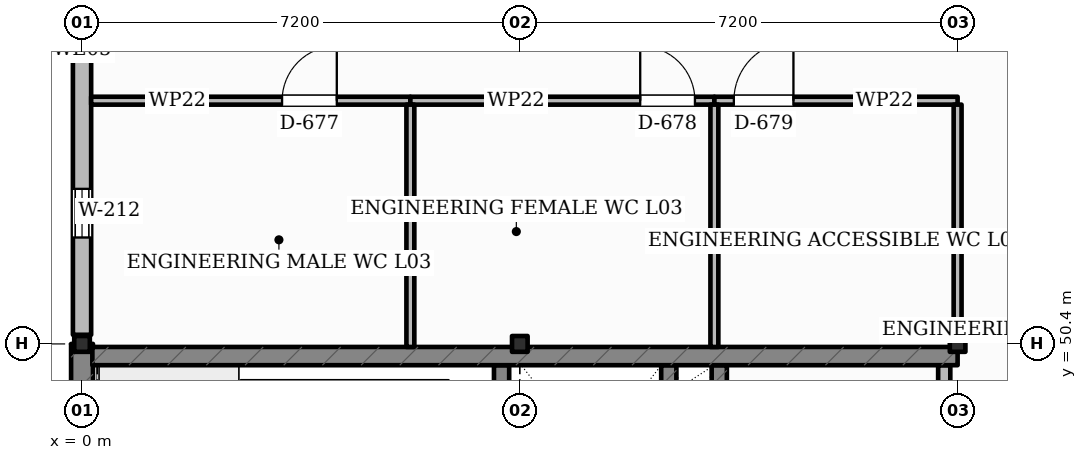
"""IFC4 building model, lengths in metres.
Left out: names, types, materials, properties, quantities, classifications, styles, units other than length and angle.
Written with IfcOpenShell. Run it as: python <this file> out.ifc"""

import sys

from ifc_helpers import new_model, si_unit, direction, frame, frame_2d, origin, origin_2d, place, context, subcontext, project, spatial, rectangle, i_section, extrude, element, fill, save


model = new_model("IFC4")
c1 = context("Model", 3, precision=1e-05, world=origin(), true_north=direction((0.0, 1.0)))
c2 = subcontext(c1, "Body", "Model", "MODEL_VIEW")
j1 = project(units=[si_unit("LENGTHUNIT", "METRE"), si_unit("PLANEANGLEUNIT", "RADIAN")], contexts=[c1])
p1 = place(None, origin())
s1 = spatial("IfcSite", under=j1, at=p1, CompositionType="ELEMENT")
p2 = place(p1, origin())
s2 = spatial("IfcBuilding", under=s1, at=p2, CompositionType="ELEMENT")
p3 = place(p2, frame((0.0, 0.0, 14.4)))
s3 = spatial("IfcBuildingStorey", under=s2, at=p3, CompositionType="ELEMENT", Elevation=14.4)
for number, where, z_axis, x_axis in (
    (1, (0.0, 50.4, 0.0), (0.0, 0.0, 1.0), (1.0, 0.0, 0.0)),
    (2, (7.2, 50.4, 0.0), (0.0, 0.0, 1.0), (1.0, 0.0, 0.0)),
    (3, (14.4, 50.4, 0.0), (0.0, 0.0, 1.0), (1.0, 0.0, 0.0)),
):
    element("IfcColumn", number, at=place(p3, frame(where, z_axis=z_axis, x_axis=x_axis)), inside=s3, PredefinedType="COLUMN", context=c2, shape_type="SweptSolid", body=[
        extrude(i_section(OverallWidth=0.256, OverallDepth=0.26, WebThickness=0.01, FlangeThickness=0.017, FilletRadius=0.013, at=origin_2d()), origin(), (0.0, 0.0, 1.0), 4.5),
    ])
p4 = place(p3, frame((0.0, 43.2, 0.0), z_axis=(0.0, 0.0, 1.0), x_axis=(0.0, 1.0, 0.0)))
e4 = element("IfcWall", 4, at=p4, inside=s3, PredefinedType="SHEAR", context=c2, shape_type="SweptSolid", body=[
    extrude(rectangle(XDim=7.2, YDim=0.36, at=frame_2d((3.6, 0.0))), origin(), (0.0, 0.0, 1.0), 3.85),
])
p5 = place(p3, frame((0.0, 50.55, 0.0), z_axis=(0.0, 0.0, 1.0), x_axis=(0.0, 1.0, 0.0)))
e5 = element("IfcWall", 5, at=p5, inside=s3, PredefinedType="SOLIDWALL", context=c2, shape_type="SweptSolid", body=[
    extrude(rectangle(XDim=6.9, YDim=0.3, at=frame_2d((3.45, 0.0))), origin(), (0.0, 0.0, 1.0), 3.85),
])
p6 = place(p5, frame((1.6, 0.0, 1.05)))
e6 = element("IfcOpeningElement", 6, at=p6, cuts=e5, PredefinedType="OPENING", context=c2, shape_type="SweptSolid", body=[
    extrude(rectangle(XDim=0.8, YDim=1.4, at=frame_2d((0.4, 0.7))), frame((0.0, 0.16, 0.0), z_axis=(0.0, -1.0, 0.0), x_axis=(1.0, 0.0, 0.0)), (0.0, 0.0, 1.0), 0.32),
])
p7 = place(p3, frame((6.9, 43.55, 0.0), z_axis=(0.0, 0.0, 1.0), x_axis=(0.0, 1.0, 0.0)))
e7 = element("IfcWall", 7, at=p7, inside=s3, PredefinedType="SHEAR", context=c2, shape_type="SweptSolid", body=[
    extrude(rectangle(XDim=6.5, YDim=0.25, at=frame_2d((3.25, 0.0))), origin(), (0.0, 0.0, 1.0), 3.6),
])
p8 = place(p7, frame((0.95, 0.0, 0.0)))
e8 = element("IfcOpeningElement", 8, at=p8, cuts=e7, PredefinedType="OPENING", context=c2, shape_type="SweptSolid", body=[
    extrude(rectangle(XDim=1.35, YDim=2.15, at=frame_2d((0.675, 1.075))), frame((0.0, 0.135, 0.0), z_axis=(0.0, -1.0, 0.0), x_axis=(1.0, 0.0, 0.0)), (0.0, 0.0, 1.0), 0.27),
])
p9 = place(p3, frame((9.65, 47.085, 0.0), z_axis=(0.0, 0.0, 1.0), x_axis=(0.0, 1.0, 0.0)))
e9 = element("IfcWall", 9, at=p9, inside=s3, PredefinedType="SHEAR", context=c2, shape_type="SweptSolid", body=[
    extrude(rectangle(XDim=2.965, YDim=0.25, at=frame_2d((1.482, 0.0))), origin(), (0.0, 0.0, 1.0), 3.6),
])
p10 = place(p3, frame((10.48, 47.085, 0.0), z_axis=(0.0, 0.0, 1.0), x_axis=(0.0, 1.0, 0.0)))
e10 = element("IfcWall", 10, at=p10, inside=s3, PredefinedType="SHEAR", context=c2, shape_type="SweptSolid", body=[
    extrude(rectangle(XDim=2.965, YDim=0.25, at=frame_2d((1.482, 0.0))), origin(), (0.0, 0.0, 1.0), 3.6),
])
p11 = place(p10, frame((0.9, 0.0, 0.0)))
e11 = element("IfcOpeningElement", 11, at=p11, cuts=e10, PredefinedType="OPENING", context=c2, shape_type="SweptSolid", body=[
    extrude(rectangle(XDim=0.92, YDim=2.05, at=frame_2d((0.46, 1.025))), frame((0.0, 0.135, 0.0), z_axis=(0.0, -1.0, 0.0), x_axis=(1.0, 0.0, 0.0)), (0.0, 0.0, 1.0), 0.27),
])
p12 = place(p3, frame((14.18, 43.55, 0.0), z_axis=(0.0, 0.0, 1.0), x_axis=(0.0, 1.0, 0.0)))
e12 = element("IfcWall", 12, at=p12, inside=s3, PredefinedType="SOLIDWALL", context=c2, shape_type="SweptSolid", body=[
    extrude(rectangle(XDim=6.5, YDim=0.2, at=frame_2d((3.25, 0.0))), origin(), (0.0, 0.0, 1.0), 3.6),
])
p13 = place(p12, frame((2.5, 0.0, 0.0)))
e13 = element("IfcOpeningElement", 13, at=p13, cuts=e12, PredefinedType="OPENING", context=c2, shape_type="SweptSolid", body=[
    extrude(rectangle(XDim=1.5, YDim=2.15, at=frame_2d((0.75, 1.075))), frame((0.0, 0.11, 0.0), z_axis=(0.0, -1.0, 0.0), x_axis=(1.0, 0.0, 0.0)), (0.0, 0.0, 1.0), 0.22),
])
p14 = place(p3, frame((0.17, 50.2, 0.0), z_axis=(0.0, 0.0, 1.0), x_axis=(1.0, 0.0, 0.0)))
e14 = element("IfcWall", 14, at=p14, inside=s3, PredefinedType="SHEAR", context=c2, shape_type="SweptSolid", body=[
    extrude(rectangle(XDim=14.23, YDim=0.3, at=frame_2d((7.115, 0.0))), origin(), (0.0, 0.0, 1.0), 3.6),
])
p15 = place(p3, frame((0.15, 54.4, 0.0), z_axis=(0.0, 0.0, 1.0), x_axis=(1.0, 0.0, 0.0)))
e15 = element("IfcWall", 15, at=p15, inside=s3, PredefinedType="PARTITIONING", context=c2, shape_type="SweptSolid", body=[
    extrude(rectangle(XDim=5.25, YDim=0.13, at=frame_2d((2.625, 0.0))), origin(), (0.0, 0.0, 1.0), 3.55),
])
p16 = place(p15, frame((3.14, 0.0, 0.0)))
e16 = element("IfcOpeningElement", 16, at=p16, cuts=e15, PredefinedType="OPENING", context=c2, shape_type="SweptSolid", body=[
    extrude(rectangle(XDim=0.9, YDim=2.05, at=frame_2d((0.45, 1.025))), frame((0.0, 0.075, 0.0), z_axis=(0.0, -1.0, 0.0), x_axis=(1.0, 0.0, 0.0)), (0.0, 0.0, 1.0), 0.15),
])
p17 = place(p3, frame((5.4, 54.4, 0.0), z_axis=(0.0, 0.0, 1.0), x_axis=(1.0, 0.0, 0.0)))
e17 = element("IfcWall", 17, at=p17, inside=s3, PredefinedType="PARTITIONING", context=c2, shape_type="SweptSolid", body=[
    extrude(rectangle(XDim=5.0, YDim=0.13, at=frame_2d((2.5, 0.0))), origin(), (0.0, 0.0, 1.0), 3.55),
])
p18 = place(p17, frame((3.78, 0.0, 0.0)))
e18 = element("IfcOpeningElement", 18, at=p18, cuts=e17, PredefinedType="OPENING", context=c2, shape_type="SweptSolid", body=[
    extrude(rectangle(XDim=0.9, YDim=2.05, at=frame_2d((0.45, 1.025))), frame((0.0, 0.075, 0.0), z_axis=(0.0, -1.0, 0.0), x_axis=(1.0, 0.0, 0.0)), (0.0, 0.0, 1.0), 0.15),
])
p19 = place(p3, frame((10.4, 54.4, 0.0), z_axis=(0.0, 0.0, 1.0), x_axis=(1.0, 0.0, 0.0)))
e19 = element("IfcWall", 19, at=p19, inside=s3, PredefinedType="PARTITIONING", context=c2, shape_type="SweptSolid", body=[
    extrude(rectangle(XDim=4.0, YDim=0.13, at=frame_2d((2.0, 0.0))), origin(), (0.0, 0.0, 1.0), 3.55),
])
p20 = place(p19, frame((0.32, 0.0, 0.0)))
e20 = element("IfcOpeningElement", 20, at=p20, cuts=e19, PredefinedType="OPENING", context=c2, shape_type="SweptSolid", body=[
    extrude(rectangle(XDim=0.98, YDim=2.1, at=frame_2d((0.49, 1.05))), frame((0.0, 0.075, 0.0), z_axis=(0.0, -1.0, 0.0), x_axis=(1.0, 0.0, 0.0)), (0.0, 0.0, 1.0), 0.15),
])
for number, where, z_axis, x_axis in (
    (21, (5.4, 50.35, 0.0), (0.0, 0.0, 1.0), (0.0, 1.0, 0.0)),
    (22, (10.4, 50.35, 0.0), (0.0, 0.0, 1.0), (0.0, 1.0, 0.0)),
):
    element("IfcWall", number, at=place(p3, frame(where, z_axis=z_axis, x_axis=x_axis)), inside=s3, PredefinedType="PARTITIONING", context=c2, shape_type="SweptSolid", body=[
        extrude(rectangle(XDim=3.985, YDim=0.13, at=frame_2d((1.992, 0.0))), origin(), (0.0, 0.0, 1.0), 3.55),
    ])
p21 = place(p3, frame((14.4, 50.532, 0.0), z_axis=(0.0, 0.0, 1.0), x_axis=(0.0, 1.0, 0.0)))
e23 = element("IfcWall", 23, at=p21, inside=s3, PredefinedType="PARTITIONING", context=c2, shape_type="SweptSolid", body=[
    extrude(rectangle(XDim=3.803, YDim=0.13, at=frame_2d((1.901, 0.0))), origin(), (0.0, 0.0, 1.0), 3.55),
])
p22 = place(p6, origin())
e24 = element("IfcWindow", 24, at=p22, inside=s3, PartitioningType="SINGLE_PANEL", PredefinedType="WINDOW", context=c2, shape_type="SweptSolid", body=[
    extrude(rectangle(XDim=0.8, YDim=1.4, at=frame_2d((0.4, 0.7))), frame((0.0, 0.03, 0.0), z_axis=(0.0, -1.0, 0.0), x_axis=(1.0, 0.0, 0.0)), (0.0, 0.0, 1.0), 0.06),
])
fill(e6, e24)
p23 = place(p16, origin())
e25 = element("IfcDoor", 25, at=p23, inside=s3, OperationType="SINGLE_SWING_RIGHT", PredefinedType="DOOR", context=c2, shape_type="SweptSolid", body=[
    extrude(rectangle(XDim=0.9, YDim=2.05, at=frame_2d((0.45, 1.025))), frame((0.0, 0.025, 0.0), z_axis=(0.0, -1.0, 0.0), x_axis=(1.0, 0.0, 0.0)), (0.0, 0.0, 1.0), 0.05),
])
fill(e16, e25)
p24 = place(p18, origin())
e26 = element("IfcDoor", 26, at=p24, inside=s3, OperationType="SINGLE_SWING_LEFT", PredefinedType="DOOR", context=c2, shape_type="SweptSolid", body=[
    extrude(rectangle(XDim=0.9, YDim=2.05, at=frame_2d((0.45, 1.025))), frame((0.0, 0.025, 0.0), z_axis=(0.0, -1.0, 0.0), x_axis=(1.0, 0.0, 0.0)), (0.0, 0.0, 1.0), 0.05),
])
fill(e18, e26)
p25 = place(p20, origin())
e27 = element("IfcDoor", 27, at=p25, inside=s3, OperationType="SINGLE_SWING_RIGHT", PredefinedType="DOOR", context=c2, shape_type="SweptSolid", body=[
    extrude(rectangle(XDim=0.98, YDim=2.1, at=frame_2d((0.49, 1.05))), frame((0.0, 0.025, 0.0), z_axis=(0.0, -1.0, 0.0), x_axis=(1.0, 0.0, 0.0)), (0.0, 0.0, 1.0), 0.05),
])
fill(e20, e27)
save(model, sys.argv[1])
